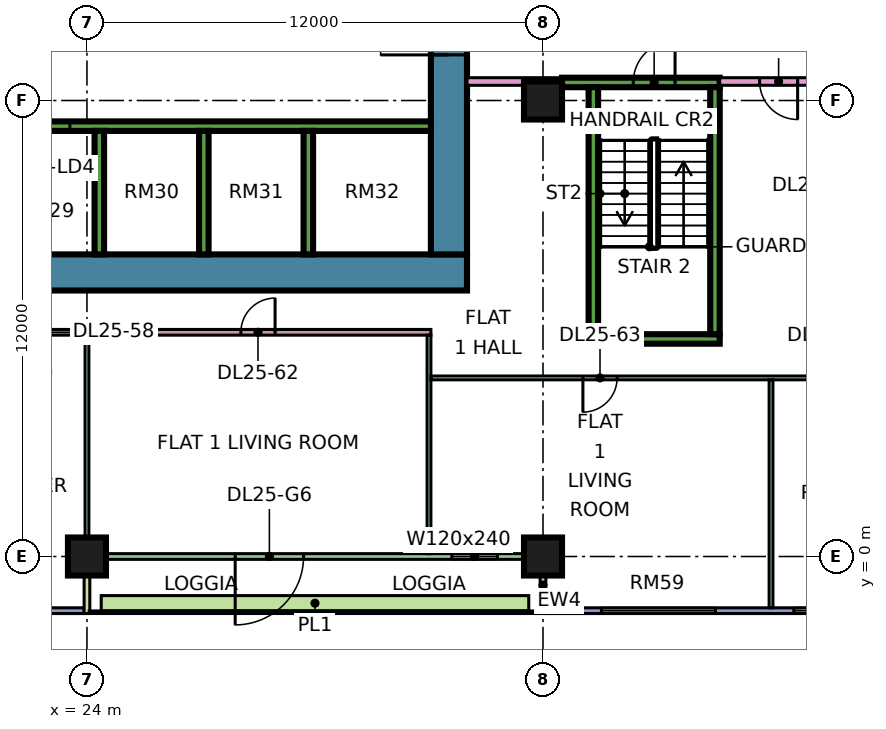
"""IFC4 building model, lengths in metres.
Left out: names, types, materials, properties, quantities, classifications, styles, units other than length and angle.
Written with IfcOpenShell. Run it as: python <this file> out.ifc"""

import sys

from ifc_helpers import new_model, si_unit, direction, frame, frame_2d, origin, origin_2d, place, context, subcontext, project, spatial, rectangle, extrude, element, fill, save


model = new_model("IFC4")
c1 = context("Model", 3, precision=1e-05, world=origin(), true_north=direction((0.0, 1.0)))
c2 = subcontext(c1, "Body", "Model", "MODEL_VIEW")
j1 = project(units=[si_unit("LENGTHUNIT", "METRE"), si_unit("PLANEANGLEUNIT", "RADIAN")], contexts=[c1])
p1 = place(None, origin())
s1 = spatial("IfcSite", under=j1, at=p1, CompositionType="ELEMENT")
p2 = place(p1, origin())
s2 = spatial("IfcBuilding", under=s1, at=p2, CompositionType="ELEMENT")
p3 = place(p2, frame((0.0, 0.0, 110.65)))
s3 = spatial("IfcBuildingStorey", under=s2, at=p3, CompositionType="ELEMENT", Elevation=110.65)
for number, where, z_axis, x_axis in (
    (1, (24.0, 0.0, 0.0), (0.0, 0.0, 1.0), (1.0, 0.0, 0.0)),
    (2, (36.0, 0.0, 0.0), (0.0, 0.0, 1.0), (1.0, 0.0, 0.0)),
    (3, (36.0, 12.0, 0.0), (0.0, 0.0, 1.0), (1.0, 0.0, 0.0)),
):
    element("IfcColumn", number, at=place(p3, frame(where, z_axis=z_axis, x_axis=x_axis)), inside=s3, PredefinedType="COLUMN", context=c2, shape_type="SweptSolid", body=[
        extrude(rectangle(XDim=1.0, YDim=1.0, at=origin_2d()), origin(), (0.0, 0.0, 1.0), 3.75),
    ])
p4 = place(p3, frame((9.0, 7.475, 0.0), z_axis=(0.0, 0.0, 1.0), x_axis=(1.0, 0.0, 0.0)))
e4 = element("IfcWall", 4, at=p4, inside=s3, PredefinedType="SHEAR", context=c2, shape_type="SweptSolid", body=[
    extrude(rectangle(XDim=25.0, YDim=0.95, at=frame_2d((12.5, 0.0))), origin(), (0.0, 0.0, 1.0), 3.75),
])
p5 = place(p3, frame((33.525, 7.95, 0.0), z_axis=(0.0, 0.0, 1.0), x_axis=(0.0, 1.0, 0.0)))
e5 = element("IfcWall", 5, at=p5, inside=s3, PredefinedType="SHEAR", context=c2, shape_type="SweptSolid", body=[
    extrude(rectangle(XDim=11.1, YDim=0.95, at=frame_2d((5.55, 0.0))), origin(), (0.0, 0.0, 1.0), 3.75),
])
p6 = place(p5, frame((5.25, 0.0, 0.0)))
e6 = element("IfcOpeningElement", 6, at=p6, cuts=e5, PredefinedType="OPENING", context=c2, shape_type="SweptSolid", body=[
    extrude(rectangle(XDim=1.8, YDim=2.4, at=frame_2d((0.9, 1.2))), frame((0.0, 0.485, 0.0), z_axis=(0.0, -1.0, 0.0), x_axis=(1.0, 0.0, 0.0)), (0.0, 0.0, 1.0), 0.97),
])
p7 = place(p3, frame((13.45, 11.325, 0.0), z_axis=(0.0, 0.0, 1.0), x_axis=(1.0, 0.0, 0.0)))
e7 = element("IfcWall", 7, at=p7, inside=s3, PredefinedType="SHEAR", context=c2, shape_type="SweptSolid", body=[
    extrude(rectangle(XDim=19.6, YDim=0.25, at=frame_2d((9.8, 0.0))), origin(), (0.0, 0.0, 1.0), 3.75),
])
p8 = place(p7, frame((0.65, 0.0, 0.0)))
e8 = element("IfcOpeningElement", 8, at=p8, cuts=e7, PredefinedType="OPENING", context=c2, shape_type="SweptSolid", body=[
    extrude(rectangle(XDim=1.2, YDim=2.2, at=frame_2d((0.6, 1.1))), frame((0.0, 0.135, 0.0), z_axis=(0.0, -1.0, 0.0), x_axis=(1.0, 0.0, 0.0)), (0.0, 0.0, 1.0), 0.27),
])
p9 = place(p7, frame((3.4, 0.0, 0.0)))
e9 = element("IfcOpeningElement", 9, at=p9, cuts=e7, PredefinedType="OPENING", context=c2, shape_type="SweptSolid", body=[
    extrude(rectangle(XDim=1.2, YDim=2.2, at=frame_2d((0.6, 1.1))), frame((0.0, 0.135, 0.0), z_axis=(0.0, -1.0, 0.0), x_axis=(1.0, 0.0, 0.0)), (0.0, 0.0, 1.0), 0.27),
])
p10 = place(p7, frame((6.15, 0.0, 0.0)))
e10 = element("IfcOpeningElement", 10, at=p10, cuts=e7, PredefinedType="OPENING", context=c2, shape_type="SweptSolid", body=[
    extrude(rectangle(XDim=1.2, YDim=2.2, at=frame_2d((0.6, 1.1))), frame((0.0, 0.135, 0.0), z_axis=(0.0, -1.0, 0.0), x_axis=(1.0, 0.0, 0.0)), (0.0, 0.0, 1.0), 0.27),
])
p11 = place(p7, frame((8.9, 0.0, 0.0)))
e11 = element("IfcOpeningElement", 11, at=p11, cuts=e7, PredefinedType="OPENING", context=c2, shape_type="SweptSolid", body=[
    extrude(rectangle(XDim=1.2, YDim=2.2, at=frame_2d((0.6, 1.1))), frame((0.0, 0.135, 0.0), z_axis=(0.0, -1.0, 0.0), x_axis=(1.0, 0.0, 0.0)), (0.0, 0.0, 1.0), 0.27),
])
for number, where, z_axis, x_axis in (
    (12, (24.325, 7.95, 0.0), (0.0, 0.0, 1.0), (0.0, 1.0, 0.0)),
    (13, (27.075, 7.95, 0.0), (0.0, 0.0, 1.0), (0.0, 1.0, 0.0)),
    (14, (29.825, 7.95, 0.0), (0.0, 0.0, 1.0), (0.0, 1.0, 0.0)),
):
    element("IfcWall", number, at=place(p3, frame(where, z_axis=z_axis, x_axis=x_axis)), inside=s3, PredefinedType="SHEAR", context=c2, shape_type="SweptSolid", body=[
        extrude(rectangle(XDim=3.25, YDim=0.25, at=frame_2d((1.625, 0.0))), origin(), (0.0, 0.0, 1.0), 3.75),
    ])
p12 = place(p3, frame((37.2, 5.725, 0.0), z_axis=(0.0, 0.0, 1.0), x_axis=(1.0, 0.0, 0.0)))
e15 = element("IfcWall", 15, at=p12, inside=s3, PredefinedType="SHEAR", context=c2, shape_type="SweptSolid", body=[
    extrude(rectangle(XDim=3.45, YDim=0.25, at=frame_2d((1.725, 0.0))), origin(), (0.0, 0.0, 1.0), 3.75),
])
p13 = place(p3, frame((36.5, 12.475, 0.0), z_axis=(0.0, 0.0, 1.0), x_axis=(1.0, 0.0, 0.0)))
e16 = element("IfcWall", 16, at=p13, inside=s3, PredefinedType="SHEAR", context=c2, shape_type="SweptSolid", body=[
    extrude(rectangle(XDim=4.15, YDim=0.25, at=frame_2d((2.075, 0.0))), origin(), (0.0, 0.0, 1.0), 3.75),
])
p14 = place(p13, frame((1.875, 0.0, 0.0)))
e17 = element("IfcOpeningElement", 17, at=p14, cuts=e16, PredefinedType="OPENING", context=c2, shape_type="SweptSolid", body=[
    extrude(rectangle(XDim=1.1, YDim=2.2, at=frame_2d((0.55, 1.1))), frame((0.0, 0.135, 0.0), z_axis=(0.0, -1.0, 0.0), x_axis=(1.0, 0.0, 0.0)), (0.0, 0.0, 1.0), 0.27),
])
for number, where, z_axis, x_axis in (
    (18, (37.325, 5.85, 0.0), (0.0, 0.0, 1.0), (0.0, 1.0, 0.0)),
    (19, (40.525, 5.85, 0.0), (0.0, 0.0, 1.0), (0.0, 1.0, 0.0)),
):
    element("IfcWall", number, at=place(p3, frame(where, z_axis=z_axis, x_axis=x_axis)), inside=s3, PredefinedType="SHEAR", context=c2, shape_type="SweptSolid", body=[
        extrude(rectangle(XDim=6.5, YDim=0.25, at=frame_2d((3.25, 0.0))), origin(), (0.0, 0.0, 1.0), 3.75),
    ])
p15 = place(p3, frame((12.5, -1.425, 0.0), z_axis=(0.0, 0.0, 1.0), x_axis=(1.0, 0.0, 0.0)))
e20 = element("IfcWall", 20, at=p15, inside=s3, PredefinedType="SOLIDWALL", context=c2, shape_type="SweptSolid", body=[
    extrude(rectangle(XDim=11.425, YDim=0.15, at=frame_2d((5.712, 0.0))), origin(), (0.0, 0.0, 1.0), 3.35),
])
p16 = place(p15, frame((0.35, 0.0, 0.45)))
e21 = element("IfcOpeningElement", 21, at=p16, cuts=e20, PredefinedType="OPENING", context=c2, shape_type="SweptSolid", body=[
    extrude(rectangle(XDim=1.8, YDim=2.4, at=frame_2d((0.9, 1.2))), frame((0.0, 0.085, 0.0), z_axis=(0.0, -1.0, 0.0), x_axis=(1.0, 0.0, 0.0)), (0.0, 0.0, 1.0), 0.17),
])
p17 = place(p15, frame((3.1, 0.0, 0.45)))
e22 = element("IfcOpeningElement", 22, at=p17, cuts=e20, PredefinedType="OPENING", context=c2, shape_type="SweptSolid", body=[
    extrude(rectangle(XDim=1.8, YDim=2.4, at=frame_2d((0.9, 1.2))), frame((0.0, 0.085, 0.0), z_axis=(0.0, -1.0, 0.0), x_axis=(1.0, 0.0, 0.0)), (0.0, 0.0, 1.0), 0.17),
])
p18 = place(p15, frame((6.962, 0.0, 0.45)))
e23 = element("IfcOpeningElement", 23, at=p18, cuts=e20, PredefinedType="OPENING", context=c2, shape_type="SweptSolid", body=[
    extrude(rectangle(XDim=3.0, YDim=2.4, at=frame_2d((1.5, 1.2))), frame((0.0, 0.085, 0.0), z_axis=(0.0, -1.0, 0.0), x_axis=(1.0, 0.0, 0.0)), (0.0, 0.0, 1.0), 0.17),
])
p19 = place(p3, frame((24.075, 0.0, 0.0), z_axis=(0.0, 0.0, 1.0), x_axis=(1.0, 0.0, 0.0)))
e24 = element("IfcWall", 24, at=p19, inside=s3, PredefinedType="SOLIDWALL", context=c2, shape_type="SweptSolid", body=[
    extrude(rectangle(XDim=11.85, YDim=0.15, at=frame_2d((5.925, 0.0))), origin(), (0.0, 0.0, 1.0), 3.35),
])
p20 = place(p19, frame((3.825, 0.0, 0.0)))
e25 = element("IfcOpeningElement", 25, at=p20, cuts=e24, PredefinedType="OPENING", context=c2, shape_type="SweptSolid", body=[
    extrude(rectangle(XDim=1.8, YDim=2.4, at=frame_2d((0.9, 1.2))), frame((0.0, 0.085, 0.0), z_axis=(0.0, -1.0, 0.0), x_axis=(1.0, 0.0, 0.0)), (0.0, 0.0, 1.0), 0.17),
])
p21 = place(p19, frame((9.525, 0.0, 0.45)))
e26 = element("IfcOpeningElement", 26, at=p21, cuts=e24, PredefinedType="OPENING", context=c2, shape_type="SweptSolid", body=[
    extrude(rectangle(XDim=1.2, YDim=2.4, at=frame_2d((0.6, 1.2))), frame((0.0, 0.085, 0.0), z_axis=(0.0, -1.0, 0.0), x_axis=(1.0, 0.0, 0.0)), (0.0, 0.0, 1.0), 0.17),
])
for number, where, z_axis, x_axis in (
    (27, (24.0, -1.5, 0.0), (0.0, 0.0, 1.0), (0.0, 1.0, 0.0)),
    (28, (36.0, -1.5, 0.0), (0.0, 0.0, 1.0), (0.0, 1.0, 0.0)),
):
    element("IfcWall", number, at=place(p3, frame(where, z_axis=z_axis, x_axis=x_axis)), inside=s3, PredefinedType="SOLIDWALL", context=c2, shape_type="SweptSolid", body=[
        extrude(rectangle(XDim=1.5, YDim=0.15, at=frame_2d((0.75, 0.0))), origin(), (0.0, 0.0, 1.0), 3.35),
    ])
p22 = place(p3, frame((36.075, -1.425, 0.0), z_axis=(0.0, 0.0, 1.0), x_axis=(1.0, 0.0, 0.0)))
e29 = element("IfcWall", 29, at=p22, inside=s3, PredefinedType="SOLIDWALL", context=c2, shape_type="SweptSolid", body=[
    extrude(rectangle(XDim=11.85, YDim=0.15, at=frame_2d((5.925, 0.0))), origin(), (0.0, 0.0, 1.0), 3.35),
])
p23 = place(p22, frame((1.462, 0.0, 0.45)))
e30 = element("IfcOpeningElement", 30, at=p23, cuts=e29, PredefinedType="OPENING", context=c2, shape_type="SweptSolid", body=[
    extrude(rectangle(XDim=3.0, YDim=2.4, at=frame_2d((1.5, 1.2))), frame((0.0, 0.085, 0.0), z_axis=(0.0, -1.0, 0.0), x_axis=(1.0, 0.0, 0.0)), (0.0, 0.0, 1.0), 0.17),
])
p24 = place(p22, frame((6.525, 0.0, 0.45)))
e31 = element("IfcOpeningElement", 31, at=p24, cuts=e29, PredefinedType="OPENING", context=c2, shape_type="SweptSolid", body=[
    extrude(rectangle(XDim=1.8, YDim=2.4, at=frame_2d((0.9, 1.2))), frame((0.0, 0.085, 0.0), z_axis=(0.0, -1.0, 0.0), x_axis=(1.0, 0.0, 0.0)), (0.0, 0.0, 1.0), 0.17),
])
p25 = place(p22, frame((9.488, 0.0, 0.45)))
e32 = element("IfcOpeningElement", 32, at=p25, cuts=e29, PredefinedType="OPENING", context=c2, shape_type="SweptSolid", body=[
    extrude(rectangle(XDim=1.8, YDim=2.4, at=frame_2d((0.9, 1.2))), frame((0.0, 0.085, 0.0), z_axis=(0.0, -1.0, 0.0), x_axis=(1.0, 0.0, 0.0)), (0.0, 0.0, 1.0), 0.17),
])
p26 = place(p3, frame((24.375, -1.229, 0.0), z_axis=(0.0, 0.0, 1.0), x_axis=(1.0, 0.0, 0.0)))
e33 = element("IfcWall", 33, at=p26, inside=s3, PredefinedType="SOLIDWALL", context=c2, shape_type="SweptSolid", body=[
    extrude(rectangle(XDim=11.25, YDim=0.4, at=frame_2d((5.625, 0.0))), origin(), (0.0, 0.0, 1.0), 0.7),
])
p27 = place(p3, frame((11.95, 5.9, 0.0), z_axis=(0.0, 0.0, 1.0), x_axis=(1.0, 0.0, 0.0)))
e34 = element("IfcWall", 34, at=p27, inside=s3, PredefinedType="PARTITIONING", context=c2, shape_type="SweptSolid", body=[
    extrude(rectangle(XDim=21.1, YDim=0.15, at=frame_2d((10.55, 0.0))), origin(), (0.0, 0.0, 1.0), 3.35),
])
p28 = place(p27, frame((1.1, 0.0, 0.0)))
e35 = element("IfcOpeningElement", 35, at=p28, cuts=e34, PredefinedType="OPENING", context=c2, shape_type="SweptSolid", body=[
    extrude(rectangle(XDim=0.9, YDim=2.1, at=frame_2d((0.45, 1.05))), frame((0.0, 0.085, 0.0), z_axis=(0.0, -1.0, 0.0), x_axis=(1.0, 0.0, 0.0)), (0.0, 0.0, 1.0), 0.17),
])
p29 = place(p27, frame((4.1, 0.0, 0.0)))
e36 = element("IfcOpeningElement", 36, at=p29, cuts=e34, PredefinedType="OPENING", context=c2, shape_type="SweptSolid", body=[
    extrude(rectangle(XDim=0.9, YDim=2.1, at=frame_2d((0.45, 1.05))), frame((0.0, 0.085, 0.0), z_axis=(0.0, -1.0, 0.0), x_axis=(1.0, 0.0, 0.0)), (0.0, 0.0, 1.0), 0.17),
])
p30 = place(p27, frame((10.1, 0.0, 0.0)))
e37 = element("IfcOpeningElement", 37, at=p30, cuts=e34, PredefinedType="OPENING", context=c2, shape_type="SweptSolid", body=[
    extrude(rectangle(XDim=0.9, YDim=2.1, at=frame_2d((0.45, 1.05))), frame((0.0, 0.085, 0.0), z_axis=(0.0, -1.0, 0.0), x_axis=(1.0, 0.0, 0.0)), (0.0, 0.0, 1.0), 0.17),
])
p31 = place(p27, frame((16.1, 0.0, 0.0)))
e38 = element("IfcOpeningElement", 38, at=p31, cuts=e34, PredefinedType="OPENING", context=c2, shape_type="SweptSolid", body=[
    extrude(rectangle(XDim=0.9, YDim=2.1, at=frame_2d((0.45, 1.05))), frame((0.0, 0.085, 0.0), z_axis=(0.0, -1.0, 0.0), x_axis=(1.0, 0.0, 0.0)), (0.0, 0.0, 1.0), 0.17),
])
p32 = place(p3, frame((24.0, 0.0, 0.0), z_axis=(0.0, 0.0, 1.0), x_axis=(0.0, 1.0, 0.0)))
e39 = element("IfcWall", 39, at=p32, inside=s3, PredefinedType="PARTITIONING", context=c2, shape_type="SweptSolid", body=[
    extrude(rectangle(XDim=5.825, YDim=0.1, at=frame_2d((2.913, 0.0))), origin(), (0.0, 0.0, 1.0), 3.35),
])
p33 = place(p3, frame((33.0, 0.074, 0.0), z_axis=(0.0, 0.0, 1.0), x_axis=(0.0, 1.0, 0.0)))
e40 = element("IfcWall", 40, at=p33, inside=s3, PredefinedType="PARTITIONING", context=c2, shape_type="SweptSolid", body=[
    extrude(rectangle(XDim=5.751, YDim=0.1, at=frame_2d((2.875, 0.0))), origin(), (0.0, 0.0, 1.0), 3.35),
])
p34 = place(p3, frame((33.05, 4.7, 0.0), z_axis=(0.0, 0.0, 1.0), x_axis=(1.0, 0.0, 0.0)))
e41 = element("IfcWall", 41, at=p34, inside=s3, PredefinedType="PARTITIONING", context=c2, shape_type="SweptSolid", body=[
    extrude(rectangle(XDim=14.85, YDim=0.1, at=frame_2d((7.425, 0.0))), origin(), (0.0, 0.0, 1.0), 3.35),
])
p35 = place(p34, frame((10.0, 0.0, 0.0)))
e42 = element("IfcOpeningElement", 42, at=p35, cuts=e41, PredefinedType="OPENING", context=c2, shape_type="SweptSolid", body=[
    extrude(rectangle(XDim=0.9, YDim=2.1, at=frame_2d((0.45, 1.05))), frame((0.0, 0.06, 0.0), z_axis=(0.0, -1.0, 0.0), x_axis=(1.0, 0.0, 0.0)), (0.0, 0.0, 1.0), 0.12),
])
p36 = place(p34, frame((13.0, 0.0, 0.0)))
e43 = element("IfcOpeningElement", 43, at=p36, cuts=e41, PredefinedType="OPENING", context=c2, shape_type="SweptSolid", body=[
    extrude(rectangle(XDim=0.9, YDim=2.1, at=frame_2d((0.45, 1.05))), frame((0.0, 0.06, 0.0), z_axis=(0.0, -1.0, 0.0), x_axis=(1.0, 0.0, 0.0)), (0.0, 0.0, 1.0), 0.12),
])
p37 = place(p34, frame((4.0, 0.0, 0.0)))
e44 = element("IfcOpeningElement", 44, at=p37, cuts=e41, PredefinedType="OPENING", context=c2, shape_type="SweptSolid", body=[
    extrude(rectangle(XDim=0.9, YDim=2.1, at=frame_2d((0.45, 1.05))), frame((0.0, 0.06, 0.0), z_axis=(0.0, -1.0, 0.0), x_axis=(1.0, 0.0, 0.0)), (0.0, 0.0, 1.0), 0.12),
])
p38 = place(p3, frame((34.0, 12.5, 0.0), z_axis=(0.0, 0.0, 1.0), x_axis=(1.0, 0.0, 0.0)))
e45 = element("IfcWall", 45, at=p38, inside=s3, PredefinedType="PARTITIONING", context=c2, shape_type="SweptSolid", body=[
    extrude(rectangle(XDim=2.501, YDim=0.2, at=frame_2d((1.25, 0.0))), origin(), (0.0, 0.0, 1.0), 3.35),
])
p39 = place(p3, frame((40.65, 12.5, 0.0), z_axis=(0.0, 0.0, 1.0), x_axis=(1.0, 0.0, 0.0)))
e46 = element("IfcWall", 46, at=p39, inside=s3, PredefinedType="PARTITIONING", context=c2, shape_type="SweptSolid", body=[
    extrude(rectangle(XDim=31.35, YDim=0.2, at=frame_2d((15.675, 0.0))), origin(), (0.0, 0.0, 1.0), 3.35),
])
p40 = place(p39, frame((17.1, 0.0, 0.0)))
e47 = element("IfcOpeningElement", 47, at=p40, cuts=e46, PredefinedType="OPENING", context=c2, shape_type="SweptSolid", body=[
    extrude(rectangle(XDim=1.0, YDim=2.1, at=frame_2d((0.5, 1.05))), frame((0.0, 0.11, 0.0), z_axis=(0.0, -1.0, 0.0), x_axis=(1.0, 0.0, 0.0)), (0.0, 0.0, 1.0), 0.22),
])
p41 = place(p39, frame((23.7, 0.0, 0.0)))
e48 = element("IfcOpeningElement", 48, at=p41, cuts=e46, PredefinedType="OPENING", context=c2, shape_type="SweptSolid", body=[
    extrude(rectangle(XDim=1.0, YDim=2.1, at=frame_2d((0.5, 1.05))), frame((0.0, 0.11, 0.0), z_axis=(0.0, -1.0, 0.0), x_axis=(1.0, 0.0, 0.0)), (0.0, 0.0, 1.0), 0.22),
])
p42 = place(p39, frame((1.05, 0.0, 0.0)))
e49 = element("IfcOpeningElement", 49, at=p42, cuts=e46, PredefinedType="OPENING", context=c2, shape_type="SweptSolid", body=[
    extrude(rectangle(XDim=1.0, YDim=2.1, at=frame_2d((0.5, 1.05))), frame((0.0, 0.11, 0.0), z_axis=(0.0, -1.0, 0.0), x_axis=(1.0, 0.0, 0.0)), (0.0, 0.0, 1.0), 0.22),
])
p43 = place(p3, frame((42.0, -1.35, 0.0), z_axis=(0.0, 0.0, 1.0), x_axis=(0.0, 1.0, 0.0)))
e50 = element("IfcWall", 50, at=p43, inside=s3, PredefinedType="PARTITIONING", context=c2, shape_type="SweptSolid", body=[
    extrude(rectangle(XDim=6.0, YDim=0.1, at=frame_2d((3.0, 0.0))), origin(), (0.0, 0.0, 1.0), 3.35),
])
p44 = place(p20, frame((1.8, 0.0, 0.0), z_axis=(0.0, 0.0, 1.0), x_axis=(-1.0, 0.0, 0.0)))
e51 = element("IfcDoor", 51, at=p44, inside=s3, OperationType="DOUBLE_DOOR_SINGLE_SWING", PredefinedType="DOOR", context=c2, shape_type="SweptSolid", body=[
    extrude(rectangle(XDim=1.8, YDim=2.4, at=frame_2d((0.9, 1.2))), frame((0.0, 0.025, 0.0), z_axis=(0.0, -1.0, 0.0), x_axis=(1.0, 0.0, 0.0)), (0.0, 0.0, 1.0), 0.05),
])
fill(e25, e51)
p45 = place(p21, origin())
e52 = element("IfcWindow", 52, at=p45, inside=s3, PartitioningType="SINGLE_PANEL", PredefinedType="WINDOW", context=c2, shape_type="SweptSolid", body=[
    extrude(rectangle(XDim=1.2, YDim=2.4, at=frame_2d((0.6, 1.2))), frame((0.0, 0.03, 0.0), z_axis=(0.0, -1.0, 0.0), x_axis=(1.0, 0.0, 0.0)), (0.0, 0.0, 1.0), 0.06),
])
fill(e26, e52)
p46 = place(p23, origin())
e53 = element("IfcWindow", 53, at=p46, inside=s3, PartitioningType="SINGLE_PANEL", PredefinedType="WINDOW", context=c2, shape_type="SweptSolid", body=[
    extrude(rectangle(XDim=3.0, YDim=2.4, at=frame_2d((1.5, 1.2))), frame((0.0, 0.03, 0.0), z_axis=(0.0, -1.0, 0.0), x_axis=(1.0, 0.0, 0.0)), (0.0, 0.0, 1.0), 0.06),
])
fill(e30, e53)
p47 = place(p24, origin())
e54 = element("IfcWindow", 54, at=p47, inside=s3, PartitioningType="SINGLE_PANEL", PredefinedType="WINDOW", context=c2, shape_type="SweptSolid", body=[
    extrude(rectangle(XDim=1.8, YDim=2.4, at=frame_2d((0.9, 1.2))), frame((0.0, 0.03, 0.0), z_axis=(0.0, -1.0, 0.0), x_axis=(1.0, 0.0, 0.0)), (0.0, 0.0, 1.0), 0.06),
])
fill(e31, e54)
p48 = place(p11, origin())
e55 = element("IfcDoor", 55, at=p48, inside=s3, OperationType="DOUBLE_DOOR_SLIDING", PredefinedType="DOOR", context=c2, shape_type="SweptSolid", body=[
    extrude(rectangle(XDim=1.2, YDim=2.2, at=frame_2d((0.6, 1.1))), frame((0.0, 0.025, 0.0), z_axis=(0.0, -1.0, 0.0), x_axis=(1.0, 0.0, 0.0)), (0.0, 0.0, 1.0), 0.05),
])
fill(e11, e55)
p49 = place(p6, origin())
e56 = element("IfcDoor", 56, at=p49, inside=s3, OperationType="DOUBLE_DOOR_SINGLE_SWING", PredefinedType="DOOR", context=c2, shape_type="SweptSolid", body=[
    extrude(rectangle(XDim=1.8, YDim=2.4, at=frame_2d((0.9, 1.2))), frame((0.0, 0.025, 0.0), z_axis=(0.0, -1.0, 0.0), x_axis=(1.0, 0.0, 0.0)), (0.0, 0.0, 1.0), 0.05),
])
fill(e6, e56)
p50 = place(p14, frame((1.1, 0.0, 0.0), z_axis=(0.0, 0.0, 1.0), x_axis=(-1.0, 0.0, 0.0)))
e57 = element("IfcDoor", 57, at=p50, inside=s3, OperationType="SINGLE_SWING_RIGHT", PredefinedType="DOOR", context=c2, shape_type="SweptSolid", body=[
    extrude(rectangle(XDim=1.1, YDim=2.2, at=frame_2d((0.55, 1.1))), frame((0.0, 0.025, 0.0), z_axis=(0.0, -1.0, 0.0), x_axis=(1.0, 0.0, 0.0)), (0.0, 0.0, 1.0), 0.05),
])
fill(e17, e57)
p51 = place(p42, origin())
e58 = element("IfcDoor", 58, at=p51, inside=s3, OperationType="SINGLE_SWING_RIGHT", PredefinedType="DOOR", context=c2, shape_type="SweptSolid", body=[
    extrude(rectangle(XDim=1.0, YDim=2.1, at=frame_2d((0.5, 1.05))), frame((0.0, 0.025, 0.0), z_axis=(0.0, -1.0, 0.0), x_axis=(1.0, 0.0, 0.0)), (0.0, 0.0, 1.0), 0.05),
])
fill(e49, e58)
p52 = place(p31, frame((0.9, 0.0, 0.0), z_axis=(0.0, 0.0, 1.0), x_axis=(-1.0, 0.0, 0.0)))
e59 = element("IfcDoor", 59, at=p52, inside=s3, OperationType="SINGLE_SWING_RIGHT", PredefinedType="DOOR", context=c2, shape_type="SweptSolid", body=[
    extrude(rectangle(XDim=0.9, YDim=2.1, at=frame_2d((0.45, 1.05))), frame((0.0, 0.025, 0.0), z_axis=(0.0, -1.0, 0.0), x_axis=(1.0, 0.0, 0.0)), (0.0, 0.0, 1.0), 0.05),
])
fill(e38, e59)
p53 = place(p37, frame((0.9, 0.0, 0.0), z_axis=(0.0, 0.0, 1.0), x_axis=(-1.0, 0.0, 0.0)))
e60 = element("IfcDoor", 60, at=p53, inside=s3, OperationType="SINGLE_SWING_LEFT", PredefinedType="DOOR", context=c2, shape_type="SweptSolid", body=[
    extrude(rectangle(XDim=0.9, YDim=2.1, at=frame_2d((0.45, 1.05))), frame((0.0, 0.025, 0.0), z_axis=(0.0, -1.0, 0.0), x_axis=(1.0, 0.0, 0.0)), (0.0, 0.0, 1.0), 0.05),
])
fill(e44, e60)
save(model, sys.argv[1])
